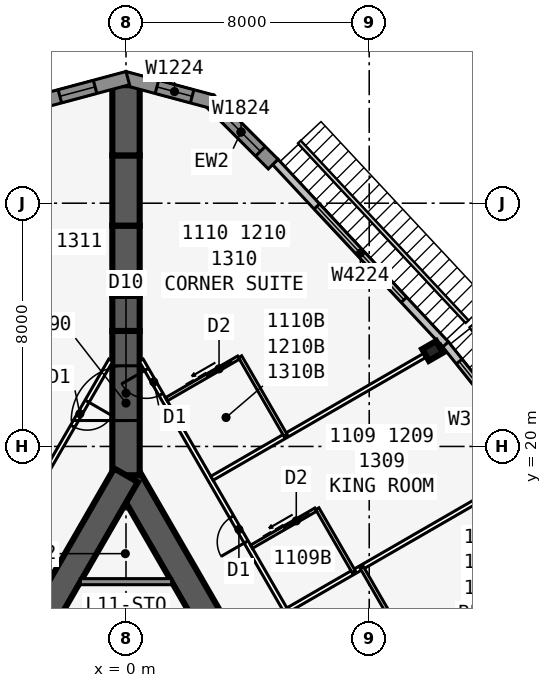
"""IFC4 building model, lengths in metres.
Left out: names, types, materials, properties, quantities, classifications, styles, units other than length and angle.
Written with IfcOpenShell. Run it as: python <this file> out.ifc"""

import sys

from ifc_helpers import new_model, si_unit, direction, frame, frame_2d, origin, origin_2d, place, context, subcontext, project, spatial, polyline, rectangle, i_section, outline, extrude, element, fill, save


model = new_model("IFC4")
c1 = context("Model", 3, precision=1e-05, world=origin(), true_north=direction((0.0, 1.0)))
c2 = subcontext(c1, "Body", "Model", "MODEL_VIEW")
j1 = project(units=[si_unit("LENGTHUNIT", "METRE"), si_unit("PLANEANGLEUNIT", "RADIAN")], contexts=[c1])
p1 = place(None, origin())
s1 = spatial("IfcSite", under=j1, at=p1, CompositionType="ELEMENT")
p2 = place(p1, origin())
s2 = spatial("IfcBuilding", under=s1, at=p2, CompositionType="ELEMENT")
p3 = place(p2, frame((0.0, 0.0, 48.9)))
s3 = spatial("IfcBuildingStorey", under=s2, at=p3, CompositionType="ELEMENT", Elevation=48.9)
p4 = place(p3, frame((16.5, -9.526, 0.0), z_axis=(0.0, 0.0, 1.0), x_axis=(-0.499999749417, 0.866025548458, 0.0)))
e1 = element("IfcWall", 1, at=p4, inside=s3, PredefinedType="SHEAR", context=c2, shape_type="SweptSolid", body=[
    extrude(rectangle(XDim=33.0, YDim=0.9, at=frame_2d((16.5, 0.0))), origin(), (0.0, 0.0, 1.0), 3.4),
])
p5 = place(p4, frame((14.15, 0.0, 0.0)))
e2 = element("IfcOpeningElement", 2, at=p5, cuts=e1, PredefinedType="OPENING", context=c2, shape_type="SweptSolid", body=[
    extrude(rectangle(XDim=1.8, YDim=2.13, at=frame_2d((0.9, 1.065))), frame((0.0, 0.46, 0.0), z_axis=(0.0, -1.0, 0.0), x_axis=(1.0, 0.0, 0.0)), (0.0, 0.0, 1.0), 0.92),
])
p6 = place(p4, frame((12.6, 0.0, 0.0)))
e3 = element("IfcOpeningElement", 3, at=p6, cuts=e1, PredefinedType="OPENING", context=c2, shape_type="SweptSolid", body=[
    extrude(rectangle(XDim=1.0, YDim=2.13, at=frame_2d((0.5, 1.065))), frame((0.0, 0.46, 0.0), z_axis=(0.0, -1.0, 0.0), x_axis=(1.0, 0.0, 0.0)), (0.0, 0.0, 1.0), 0.92),
])
p7 = place(p3, frame((0.0, 19.052, 0.0), z_axis=(0.0, 0.0, 1.0), x_axis=(-0.499999749417, -0.866025548458, 0.0)))
e4 = element("IfcWall", 4, at=p7, inside=s3, PredefinedType="SHEAR", context=c2, shape_type="SweptSolid", body=[
    extrude(rectangle(XDim=33.0, YDim=0.9, at=frame_2d((16.5, 0.0))), origin(), (0.0, 0.0, 1.0), 3.4),
])
p8 = place(p7, frame((14.15, 0.0, 0.0)))
e5 = element("IfcOpeningElement", 5, at=p8, cuts=e4, PredefinedType="OPENING", context=c2, shape_type="SweptSolid", body=[
    extrude(rectangle(XDim=1.8, YDim=2.13, at=frame_2d((0.9, 1.065))), frame((0.0, 0.46, 0.0), z_axis=(0.0, -1.0, 0.0), x_axis=(1.0, 0.0, 0.0)), (0.0, 0.0, 1.0), 0.92),
])
p9 = place(p7, frame((12.6, 0.0, 0.0)))
e6 = element("IfcOpeningElement", 6, at=p9, cuts=e4, PredefinedType="OPENING", context=c2, shape_type="SweptSolid", body=[
    extrude(rectangle(XDim=1.0, YDim=2.13, at=frame_2d((0.5, 1.065))), frame((0.0, 0.46, 0.0), z_axis=(0.0, -1.0, 0.0), x_axis=(1.0, 0.0, 0.0)), (0.0, 0.0, 1.0), 0.92),
])
p10 = place(p3, frame((0.0, 19.052, 0.0), z_axis=(0.0, 0.0, 1.0), x_axis=(0.0, 1.0, 0.0)))
e7 = element("IfcWall", 7, at=p10, inside=s3, PredefinedType="SHEAR", context=c2, shape_type="SweptSolid", body=[
    extrude(rectangle(XDim=4.746, YDim=0.9, at=frame_2d((2.373, 0.0))), origin(), (0.0, 0.0, 1.0), 3.4),
])
p11 = place(p10, frame((1.8, 0.0, 0.0)))
e8 = element("IfcOpeningElement", 8, at=p11, cuts=e7, PredefinedType="OPENING", context=c2, shape_type="SweptSolid", body=[
    extrude(rectangle(XDim=1.8, YDim=2.13, at=frame_2d((0.9, 1.065))), frame((0.0, 0.46, 0.0), z_axis=(0.0, -1.0, 0.0), x_axis=(1.0, 0.0, 0.0)), (0.0, 0.0, 1.0), 0.92),
])
p12 = place(p3, frame((0.0, 23.799, 0.0), z_axis=(0.0, 0.0, 1.0), x_axis=(0.0, 1.0, 0.0)))
e9 = element("IfcWall", 9, at=p12, inside=s3, PredefinedType="SHEAR", context=c2, shape_type="SweptSolid", body=[
    extrude(rectangle(XDim=1.155, YDim=0.9, at=frame_2d((0.577, 0.0))), origin(), (0.0, 0.0, 1.0), 3.4),
])
p13 = place(p3, frame((0.0, 24.953, 0.0), z_axis=(0.0, 0.0, 1.0), x_axis=(0.0, 1.0, 0.0)))
e10 = element("IfcWall", 10, at=p13, inside=s3, PredefinedType="SHEAR", context=c2, shape_type="SweptSolid", body=[
    extrude(rectangle(XDim=2.309, YDim=0.9, at=frame_2d((1.155, 0.0))), origin(), (0.0, 0.0, 1.0), 3.4),
])
p14 = place(p3, frame((0.0, 27.263, 0.0), z_axis=(0.0, 0.0, 1.0), x_axis=(0.0, 1.0, 0.0)))
e11 = element("IfcWall", 11, at=p14, inside=s3, PredefinedType="SHEAR", context=c2, shape_type="SweptSolid", body=[
    extrude(rectangle(XDim=2.31, YDim=0.9, at=frame_2d((1.155, 0.0))), origin(), (0.0, 0.0, 1.0), 3.4),
])
p15 = place(p3, frame((0.0, 29.572, 0.0), z_axis=(0.0, 0.0, 1.0), x_axis=(0.0, 1.0, 0.0)))
e12 = element("IfcWall", 12, at=p15, inside=s3, PredefinedType="SHEAR", context=c2, shape_type="SweptSolid", body=[
    extrude(rectangle(XDim=2.309, YDim=0.9, at=frame_2d((1.155, 0.0))), origin(), (0.0, 0.0, 1.0), 3.4),
])
p16 = place(p3, frame((10.083, 23.142, 0.0), z_axis=(0.0, 0.0, 1.0), x_axis=(-0.5, 0.866025403784, 0.0)))
e13 = element("IfcColumn", 13, at=p16, inside=s3, PredefinedType="COLUMN", context=c2, shape_type="SweptSolid", body=[
    extrude(i_section(OverallWidth=0.442, OverallDepth=0.531, WebThickness=0.066, FlangeThickness=0.106, at=origin_2d()), origin(), (0.0, 0.0, 1.0), 3.4),
])
p17 = place(p3, frame((13.664, 19.414, 0.0), z_axis=(0.0, 0.0, 1.0), x_axis=(-0.624594965756, 0.780948864364, 0.0)))
e14 = element("IfcWall", 14, at=p17, inside=s3, PredefinedType="STANDARD", context=c2, shape_type="SweptSolid", body=[
    extrude(rectangle(XDim=5.058, YDim=0.25, at=frame_2d((2.529, 0.0))), origin(), (0.0, 0.0, 1.0), 3.235),
])
p18 = place(p17, frame((0.729, 0.0, 0.45)))
e15 = element("IfcOpeningElement", 15, at=p18, cuts=e14, PredefinedType="OPENING", context=c2, shape_type="SweptSolid", body=[
    extrude(rectangle(XDim=3.6, YDim=2.4, at=frame_2d((1.8, 1.2))), frame((0.0, 0.135, 0.0), z_axis=(0.0, -1.0, 0.0), x_axis=(1.0, 0.0, 0.0)), (0.0, 0.0, 1.0), 0.27),
])
p19 = place(p3, frame((10.511, 23.357, 0.0), z_axis=(0.0, 0.0, 1.0), x_axis=(-0.682289646561, 0.731081964075, 0.0)))
e16 = element("IfcWall", 16, at=p19, inside=s3, PredefinedType="STANDARD", context=c2, shape_type="SweptSolid", body=[
    extrude(rectangle(XDim=8.211, YDim=0.25, at=frame_2d((4.105, 0.0))), origin(), (0.0, 0.0, 1.0), 3.235),
])
p20 = place(p19, frame((2.006, 0.0, 0.45)))
e17 = element("IfcOpeningElement", 17, at=p20, cuts=e16, PredefinedType="OPENING", context=c2, shape_type="SweptSolid", body=[
    extrude(rectangle(XDim=4.2, YDim=2.4, at=frame_2d((2.1, 1.2))), frame((0.0, 0.135, 0.0), z_axis=(0.0, -1.0, 0.0), x_axis=(1.0, 0.0, 0.0)), (0.0, 0.0, 1.0), 0.27),
])
p21 = place(p3, frame((4.841, 29.286, 0.0), z_axis=(0.0, 0.0, 1.0), x_axis=(-0.707106781187, 0.707106781187, 0.0)))
e18 = element("IfcWall", 18, at=p21, inside=s3, PredefinedType="SOLIDWALL", context=c2, shape_type="SweptSolid", body=[
    extrude(rectangle(XDim=2.988, YDim=0.45, at=frame_2d((1.494, 0.0))), origin(), (0.0, 0.0, 1.0), 3.235),
])
p22 = place(p21, frame((0.594, 0.0, 0.45)))
e19 = element("IfcOpeningElement", 19, at=p22, cuts=e18, PredefinedType="OPENING", context=c2, shape_type="SweptSolid", body=[
    extrude(rectangle(XDim=1.8, YDim=2.4, at=frame_2d((0.9, 1.2))), frame((0.0, 0.235, 0.0), z_axis=(0.0, -1.0, 0.0), x_axis=(1.0, 0.0, 0.0)), (0.0, 0.0, 1.0), 0.47),
])
p23 = place(p3, frame((2.829, 31.341, 0.0), z_axis=(0.0, 0.0, 1.0), x_axis=(-0.965930548995, 0.258801419081, 0.0)))
e20 = element("IfcWall", 20, at=p23, inside=s3, PredefinedType="SOLIDWALL", context=c2, shape_type="SweptSolid", body=[
    extrude(outline(polyline([(2.989, 0.225), (2.929, 0.225), (2.438, 0.093), (2.402, 0.225), (0.0, 0.225), (0.0, -0.225), (2.989, -0.225), (2.989, 0.225)])), origin(), (0.0, 0.0, 1.0), 3.235),
])
p24 = place(p23, frame((0.676, 0.0, 0.45)))
e21 = element("IfcOpeningElement", 21, at=p24, cuts=e20, PredefinedType="OPENING", context=c2, shape_type="SweptSolid", body=[
    extrude(rectangle(XDim=1.2, YDim=2.4, at=frame_2d((0.6, 1.2))), frame((0.0, 0.235, 0.0), z_axis=(0.0, -1.0, 0.0), x_axis=(1.0, 0.0, 0.0)), (0.0, 0.0, 1.0), 0.47),
])
p25 = place(p3, frame((0.058, 32.114, 0.0), z_axis=(0.0, 0.0, 1.0), x_axis=(-0.965930548995, -0.258801419081, 0.0)))
e22 = element("IfcWall", 22, at=p25, inside=s3, PredefinedType="SOLIDWALL", context=c2, shape_type="SweptSolid", body=[
    extrude(outline(polyline([(2.989, 0.225), (0.586, 0.225), (0.551, 0.093), (0.059, 0.225), (0.0, 0.225), (0.0, -0.225), (2.989, -0.225), (2.989, 0.225)])), origin(), (0.0, 0.0, 1.0), 3.235),
])
p26 = place(p25, frame((1.113, 0.0, 0.45)))
e23 = element("IfcOpeningElement", 23, at=p26, cuts=e22, PredefinedType="OPENING", context=c2, shape_type="SweptSolid", body=[
    extrude(rectangle(XDim=1.2, YDim=2.4, at=frame_2d((0.6, 1.2))), frame((0.0, 0.235, 0.0), z_axis=(0.0, -1.0, 0.0), x_axis=(1.0, 0.0, 0.0)), (0.0, 0.0, 1.0), 0.47),
])
p27 = place(p3, frame((20.027, -10.985, 0.0), z_axis=(0.0, 0.0, 1.0), x_axis=(-0.500001677587, 0.866024435227, 0.0)))
e24 = element("IfcWall", 24, at=p27, inside=s3, PredefinedType="PARTITIONING", context=c2, shape_type="SweptSolid", body=[
    extrude(rectangle(XDim=39.054, YDim=0.15, at=frame_2d((19.527, 0.0))), origin(), (0.0, 0.0, 1.0), 3.235),
])
p28 = place(p27, frame((1.558, 0.0, 0.0)))
e25 = element("IfcOpeningElement", 25, at=p28, cuts=e24, PredefinedType="OPENING", context=c2, shape_type="SweptSolid", body=[
    extrude(rectangle(XDim=0.95, YDim=2.13, at=frame_2d((0.475, 1.065))), frame((0.0, 0.085, 0.0), z_axis=(0.0, -1.0, 0.0), x_axis=(1.0, 0.0, 0.0)), (0.0, 0.0, 1.0), 0.17),
])
p29 = place(p27, frame((12.152, 0.0, 0.0)))
e26 = element("IfcOpeningElement", 26, at=p29, cuts=e24, PredefinedType="OPENING", context=c2, shape_type="SweptSolid", body=[
    extrude(rectangle(XDim=0.95, YDim=2.13, at=frame_2d((0.475, 1.065))), frame((0.0, 0.085, 0.0), z_axis=(0.0, -1.0, 0.0), x_axis=(1.0, 0.0, 0.0)), (0.0, 0.0, 1.0), 0.17),
])
p30 = place(p27, frame((17.152, 0.0, 0.0)))
e27 = element("IfcOpeningElement", 27, at=p30, cuts=e24, PredefinedType="OPENING", context=c2, shape_type="SweptSolid", body=[
    extrude(rectangle(XDim=0.95, YDim=2.13, at=frame_2d((0.475, 1.065))), frame((0.0, 0.085, 0.0), z_axis=(0.0, -1.0, 0.0), x_axis=(1.0, 0.0, 0.0)), (0.0, 0.0, 1.0), 0.17),
])
p31 = place(p27, frame((21.552, 0.0, 0.0)))
e28 = element("IfcOpeningElement", 28, at=p31, cuts=e24, PredefinedType="OPENING", context=c2, shape_type="SweptSolid", body=[
    extrude(rectangle(XDim=0.95, YDim=2.13, at=frame_2d((0.475, 1.065))), frame((0.0, 0.085, 0.0), z_axis=(0.0, -1.0, 0.0), x_axis=(1.0, 0.0, 0.0)), (0.0, 0.0, 1.0), 0.17),
])
p32 = place(p27, frame((32.152, 0.0, 0.0)))
e29 = element("IfcOpeningElement", 29, at=p32, cuts=e24, PredefinedType="OPENING", context=c2, shape_type="SweptSolid", body=[
    extrude(rectangle(XDim=0.95, YDim=2.13, at=frame_2d((0.475, 1.065))), frame((0.0, 0.085, 0.0), z_axis=(0.0, -1.0, 0.0), x_axis=(1.0, 0.0, 0.0)), (0.0, 0.0, 1.0), 0.17),
])
p33 = place(p27, frame((37.752, 0.0, 0.0)))
e30 = element("IfcOpeningElement", 30, at=p33, cuts=e24, PredefinedType="OPENING", context=c2, shape_type="SweptSolid", body=[
    extrude(rectangle(XDim=0.95, YDim=2.13, at=frame_2d((0.475, 1.065))), frame((0.0, 0.085, 0.0), z_axis=(0.0, -1.0, 0.0), x_axis=(1.0, 0.0, 0.0)), (0.0, 0.0, 1.0), 0.17),
])
p34 = place(p3, frame((7.829, 10.293, 0.0), z_axis=(0.0, 0.0, 1.0), x_axis=(0.866016302457, 0.50001576363, 0.0)))
e31 = element("IfcWall", 31, at=p34, inside=s3, PredefinedType="PARTITIONING", context=c2, shape_type="SweptSolid", body=[
    extrude(rectangle(XDim=9.943, YDim=0.1, at=frame_2d((4.972, 0.0))), origin(), (0.0, 0.0, 1.0), 2.389),
])
p35 = place(p34, frame((0.45, 0.0, 0.0)))
e32 = element("IfcOpeningElement", 32, at=p35, cuts=e31, PredefinedType="OPENING", context=c2, shape_type="SweptSolid", body=[
    extrude(rectangle(XDim=0.9, YDim=2.13, at=frame_2d((0.45, 1.065))), frame((0.0, 0.06, 0.0), z_axis=(0.0, -1.0, 0.0), x_axis=(1.0, 0.0, 0.0)), (0.0, 0.0, 1.0), 0.12),
])
p36 = place(p3, frame((5.329, 14.623, 0.0), z_axis=(0.0, 0.0, 1.0), x_axis=(0.866018409083, 0.500012114982, 0.0)))
e33 = element("IfcWall", 33, at=p36, inside=s3, PredefinedType="PARTITIONING", context=c2, shape_type="SweptSolid", body=[
    extrude(rectangle(XDim=9.485, YDim=0.15, at=frame_2d((4.742, 0.0))), origin(), (0.0, 0.0, 1.0), 2.389),
])
p37 = place(p3, frame((2.829, 18.954, 0.0), z_axis=(0.0, 0.0, 1.0), x_axis=(0.866020536561, 0.500008430184, 0.0)))
e34 = element("IfcWall", 34, at=p37, inside=s3, PredefinedType="PARTITIONING", context=c2, shape_type="SweptSolid", body=[
    extrude(rectangle(XDim=8.72, YDim=0.15, at=frame_2d((4.36, 0.0))), origin(), (0.0, 0.0, 1.0), 2.389),
])
p38 = place(p3, frame((9.253, 13.425, 0.0), z_axis=(0.0, 0.0, 1.0), x_axis=(-0.499990139034, 0.866031096941, 0.0)))
e35 = element("IfcWall", 35, at=p38, inside=s3, PredefinedType="PLUMBINGWALL", context=c2, shape_type="SweptSolid", body=[
    extrude(rectangle(XDim=3.0, YDim=0.12, at=frame_2d((1.5, 0.0))), origin(), (0.0, 0.0, 1.0), 3.235),
])
p39 = place(p3, frame((7.493, 15.873, 0.0), z_axis=(0.0, 0.0, 1.0), x_axis=(-0.499957262057, 0.866050077142, 0.0)))
e36 = element("IfcWall", 36, at=p39, inside=s3, PredefinedType="PLUMBINGWALL", context=c2, shape_type="SweptSolid", body=[
    extrude(rectangle(XDim=2.4, YDim=0.12, at=frame_2d((1.2, 0.0))), origin(), (0.0, 0.0, 1.0), 3.235),
])
p40 = place(p3, frame((4.128, 16.702, 0.0), z_axis=(0.0, 0.0, 1.0), x_axis=(0.866048967903, 0.499959183527, 0.0)))
e37 = element("IfcWall", 37, at=p40, inside=s3, PredefinedType="PLUMBINGWALL", context=c2, shape_type="SweptSolid", body=[
    extrude(rectangle(XDim=2.44, YDim=0.12, at=frame_2d((1.22, 0.0))), origin(), (0.0, 0.0, 1.0), 3.235),
])
p41 = place(p40, frame((1.25, 0.0, 0.0)))
e38 = element("IfcOpeningElement", 38, at=p41, cuts=e37, PredefinedType="OPENING", context=c2, shape_type="SweptSolid", body=[
    extrude(rectangle(XDim=0.9, YDim=2.13, at=frame_2d((0.45, 1.065))), frame((0.0, 0.07, 0.0), z_axis=(0.0, -1.0, 0.0), x_axis=(1.0, 0.0, 0.0)), (0.0, 0.0, 1.0), 0.14),
])
p42 = place(p3, frame((5.253, 20.354, 0.0), z_axis=(0.0, 0.0, 1.0), x_axis=(-0.499990139034, 0.866031096941, 0.0)))
e39 = element("IfcWall", 39, at=p42, inside=s3, PredefinedType="PLUMBINGWALL", context=c2, shape_type="SweptSolid", body=[
    extrude(rectangle(XDim=3.0, YDim=0.12, at=frame_2d((1.5, 0.0))), origin(), (0.0, 0.0, 1.0), 3.235),
])
p43 = place(p3, frame((1.329, 21.552, 0.0), z_axis=(0.0, 0.0, 1.0), x_axis=(0.865997131366, 0.500048966069, 0.0)))
e40 = element("IfcWall", 40, at=p43, inside=s3, PredefinedType="PLUMBINGWALL", context=c2, shape_type="SweptSolid", body=[
    extrude(rectangle(XDim=2.74, YDim=0.12, at=frame_2d((1.37, 0.0))), origin(), (0.0, 0.0, 1.0), 3.235),
])
p44 = place(p43, frame((1.55, 0.0, 0.0)))
e41 = element("IfcOpeningElement", 41, at=p44, cuts=e40, PredefinedType="OPENING", context=c2, shape_type="SweptSolid", body=[
    extrude(rectangle(XDim=0.9, YDim=2.13, at=frame_2d((0.45, 1.065))), frame((0.0, 0.07, 0.0), z_axis=(0.0, -1.0, 0.0), x_axis=(1.0, 0.0, 0.0)), (0.0, 0.0, 1.0), 0.14),
])
p45 = place(p3, frame((-0.5, 22.836, 0.0), z_axis=(0.0, 0.0, 1.0), x_axis=(-0.500001677587, -0.866024435227, 0.0)))
e42 = element("IfcWall", 42, at=p45, inside=s3, PredefinedType="PARTITIONING", context=c2, shape_type="SweptSolid", body=[
    extrude(rectangle(XDim=39.054, YDim=0.15, at=frame_2d((19.527, 0.0))), origin(), (0.0, 0.0, 1.0), 3.235),
])
p46 = place(p45, frame((1.558, 0.0, 0.0)))
e43 = element("IfcOpeningElement", 43, at=p46, cuts=e42, PredefinedType="OPENING", context=c2, shape_type="SweptSolid", body=[
    extrude(rectangle(XDim=0.95, YDim=2.13, at=frame_2d((0.475, 1.065))), frame((0.0, 0.085, 0.0), z_axis=(0.0, -1.0, 0.0), x_axis=(1.0, 0.0, 0.0)), (0.0, 0.0, 1.0), 0.17),
])
p47 = place(p45, frame((12.752, 0.0, 0.0)))
e44 = element("IfcOpeningElement", 44, at=p47, cuts=e42, PredefinedType="OPENING", context=c2, shape_type="SweptSolid", body=[
    extrude(rectangle(XDim=0.95, YDim=2.13, at=frame_2d((0.475, 1.065))), frame((0.0, 0.085, 0.0), z_axis=(0.0, -1.0, 0.0), x_axis=(1.0, 0.0, 0.0)), (0.0, 0.0, 1.0), 0.17),
])
p48 = place(p45, frame((17.152, 0.0, 0.0)))
e45 = element("IfcOpeningElement", 45, at=p48, cuts=e42, PredefinedType="OPENING", context=c2, shape_type="SweptSolid", body=[
    extrude(rectangle(XDim=0.95, YDim=2.13, at=frame_2d((0.475, 1.065))), frame((0.0, 0.085, 0.0), z_axis=(0.0, -1.0, 0.0), x_axis=(1.0, 0.0, 0.0)), (0.0, 0.0, 1.0), 0.17),
])
p49 = place(p45, frame((22.152, 0.0, 0.0)))
e46 = element("IfcOpeningElement", 46, at=p49, cuts=e42, PredefinedType="OPENING", context=c2, shape_type="SweptSolid", body=[
    extrude(rectangle(XDim=0.95, YDim=2.13, at=frame_2d((0.475, 1.065))), frame((0.0, 0.085, 0.0), z_axis=(0.0, -1.0, 0.0), x_axis=(1.0, 0.0, 0.0)), (0.0, 0.0, 1.0), 0.17),
])
p50 = place(p45, frame((27.152, 0.0, 0.0)))
e47 = element("IfcOpeningElement", 47, at=p50, cuts=e42, PredefinedType="OPENING", context=c2, shape_type="SweptSolid", body=[
    extrude(rectangle(XDim=0.95, YDim=2.13, at=frame_2d((0.475, 1.065))), frame((0.0, 0.085, 0.0), z_axis=(0.0, -1.0, 0.0), x_axis=(1.0, 0.0, 0.0)), (0.0, 0.0, 1.0), 0.17),
])
p51 = place(p45, frame((36.546, 0.0, 0.0)))
e48 = element("IfcOpeningElement", 48, at=p51, cuts=e42, PredefinedType="OPENING", context=c2, shape_type="SweptSolid", body=[
    extrude(rectangle(XDim=0.95, YDim=2.13, at=frame_2d((0.475, 1.065))), frame((0.0, 0.085, 0.0), z_axis=(0.0, -1.0, 0.0), x_axis=(1.0, 0.0, 0.0)), (0.0, 0.0, 1.0), 0.17),
])
p52 = place(p3, frame((-1.501, 15.552, 0.0), z_axis=(0.0, 0.0, 1.0), x_axis=(1.0, 0.0, 0.0)))
e49 = element("IfcWall", 49, at=p52, inside=s3, PredefinedType="SOLIDWALL", context=c2, shape_type="SweptSolid", body=[
    extrude(rectangle(XDim=3.002, YDim=0.2, at=frame_2d((1.501, 0.0))), origin(), (0.0, 0.0, 1.0), 3.235),
])
p53 = place(p18, origin())
e50 = element("IfcWindow", 50, at=p53, inside=s3, PartitioningType="SINGLE_PANEL", PredefinedType="WINDOW", context=c2, shape_type="SweptSolid", body=[
    extrude(rectangle(XDim=3.6, YDim=2.4, at=frame_2d((1.8, 1.2))), frame((0.0, 0.03, 0.0), z_axis=(0.0, -1.0, 0.0), x_axis=(1.0, 0.0, 0.0)), (0.0, 0.0, 1.0), 0.06),
])
fill(e15, e50)
p54 = place(p20, origin())
e51 = element("IfcWindow", 51, at=p54, inside=s3, PartitioningType="SINGLE_PANEL", PredefinedType="WINDOW", context=c2, shape_type="SweptSolid", body=[
    extrude(rectangle(XDim=4.2, YDim=2.4, at=frame_2d((2.1, 1.2))), frame((0.0, 0.03, 0.0), z_axis=(0.0, -1.0, 0.0), x_axis=(1.0, 0.0, 0.0)), (0.0, 0.0, 1.0), 0.06),
])
fill(e17, e51)
p55 = place(p22, origin())
e52 = element("IfcWindow", 52, at=p55, inside=s3, PartitioningType="SINGLE_PANEL", PredefinedType="WINDOW", context=c2, shape_type="SweptSolid", body=[
    extrude(rectangle(XDim=1.8, YDim=2.4, at=frame_2d((0.9, 1.2))), frame((0.0, 0.03, 0.0), z_axis=(0.0, -1.0, 0.0), x_axis=(1.0, 0.0, 0.0)), (0.0, 0.0, 1.0), 0.06),
])
fill(e19, e52)
p56 = place(p24, origin())
e53 = element("IfcWindow", 53, at=p56, inside=s3, PartitioningType="SINGLE_PANEL", PredefinedType="WINDOW", context=c2, shape_type="SweptSolid", body=[
    extrude(rectangle(XDim=1.2, YDim=2.4, at=frame_2d((0.6, 1.2))), frame((0.0, 0.03, 0.0), z_axis=(0.0, -1.0, 0.0), x_axis=(1.0, 0.0, 0.0)), (0.0, 0.0, 1.0), 0.06),
])
fill(e21, e53)
p57 = place(p26, origin())
e54 = element("IfcWindow", 54, at=p57, inside=s3, PartitioningType="SINGLE_PANEL", PredefinedType="WINDOW", context=c2, shape_type="SweptSolid", body=[
    extrude(rectangle(XDim=1.2, YDim=2.4, at=frame_2d((0.6, 1.2))), frame((0.0, 0.03, 0.0), z_axis=(0.0, -1.0, 0.0), x_axis=(1.0, 0.0, 0.0)), (0.0, 0.0, 1.0), 0.06),
])
fill(e23, e54)
p58 = place(p41, origin())
e55 = element("IfcDoor", 55, at=p58, inside=s3, OperationType="SLIDING_TO_LEFT", PredefinedType="DOOR", context=c2, shape_type="SweptSolid", body=[
    extrude(rectangle(XDim=0.9, YDim=2.13, at=frame_2d((0.45, 1.065))), frame((0.0, 0.025, 0.0), z_axis=(0.0, -1.0, 0.0), x_axis=(1.0, 0.0, 0.0)), (0.0, 0.0, 1.0), 0.05),
])
fill(e38, e55)
p59 = place(p32, origin())
e56 = element("IfcDoor", 56, at=p59, inside=s3, OperationType="SINGLE_SWING_LEFT", PredefinedType="DOOR", context=c2, shape_type="SweptSolid", body=[
    extrude(rectangle(XDim=0.95, YDim=2.13, at=frame_2d((0.475, 1.065))), frame((0.0, 0.025, 0.0), z_axis=(0.0, -1.0, 0.0), x_axis=(1.0, 0.0, 0.0)), (0.0, 0.0, 1.0), 0.05),
])
fill(e29, e56)
p60 = place(p44, origin())
e57 = element("IfcDoor", 57, at=p60, inside=s3, OperationType="SLIDING_TO_LEFT", PredefinedType="DOOR", context=c2, shape_type="SweptSolid", body=[
    extrude(rectangle(XDim=0.9, YDim=2.13, at=frame_2d((0.45, 1.065))), frame((0.0, 0.025, 0.0), z_axis=(0.0, -1.0, 0.0), x_axis=(1.0, 0.0, 0.0)), (0.0, 0.0, 1.0), 0.05),
])
fill(e41, e57)
p61 = place(p33, origin())
e58 = element("IfcDoor", 58, at=p61, inside=s3, OperationType="SINGLE_SWING_RIGHT", PredefinedType="DOOR", context=c2, shape_type="SweptSolid", body=[
    extrude(rectangle(XDim=0.95, YDim=2.13, at=frame_2d((0.475, 1.065))), frame((0.0, 0.025, 0.0), z_axis=(0.0, -1.0, 0.0), x_axis=(1.0, 0.0, 0.0)), (0.0, 0.0, 1.0), 0.05),
])
fill(e30, e58)
p62 = place(p46, origin())
e59 = element("IfcDoor", 59, at=p62, inside=s3, OperationType="SINGLE_SWING_LEFT", PredefinedType="DOOR", context=c2, shape_type="SweptSolid", body=[
    extrude(rectangle(XDim=0.95, YDim=2.13, at=frame_2d((0.475, 1.065))), frame((0.0, 0.025, 0.0), z_axis=(0.0, -1.0, 0.0), x_axis=(1.0, 0.0, 0.0)), (0.0, 0.0, 1.0), 0.05),
])
fill(e43, e59)
p63 = place(p11, origin())
e60 = element("IfcDoor", 60, at=p63, inside=s3, OperationType="DOUBLE_DOOR_DOUBLE_SWING", PredefinedType="DOOR", context=c2, shape_type="SweptSolid", body=[
    extrude(rectangle(XDim=1.8, YDim=2.13, at=frame_2d((0.9, 1.065))), frame((0.0, 0.025, 0.0), z_axis=(0.0, -1.0, 0.0), x_axis=(1.0, 0.0, 0.0)), (0.0, 0.0, 1.0), 0.05),
])
fill(e8, e60)
save(model, sys.argv[1])
